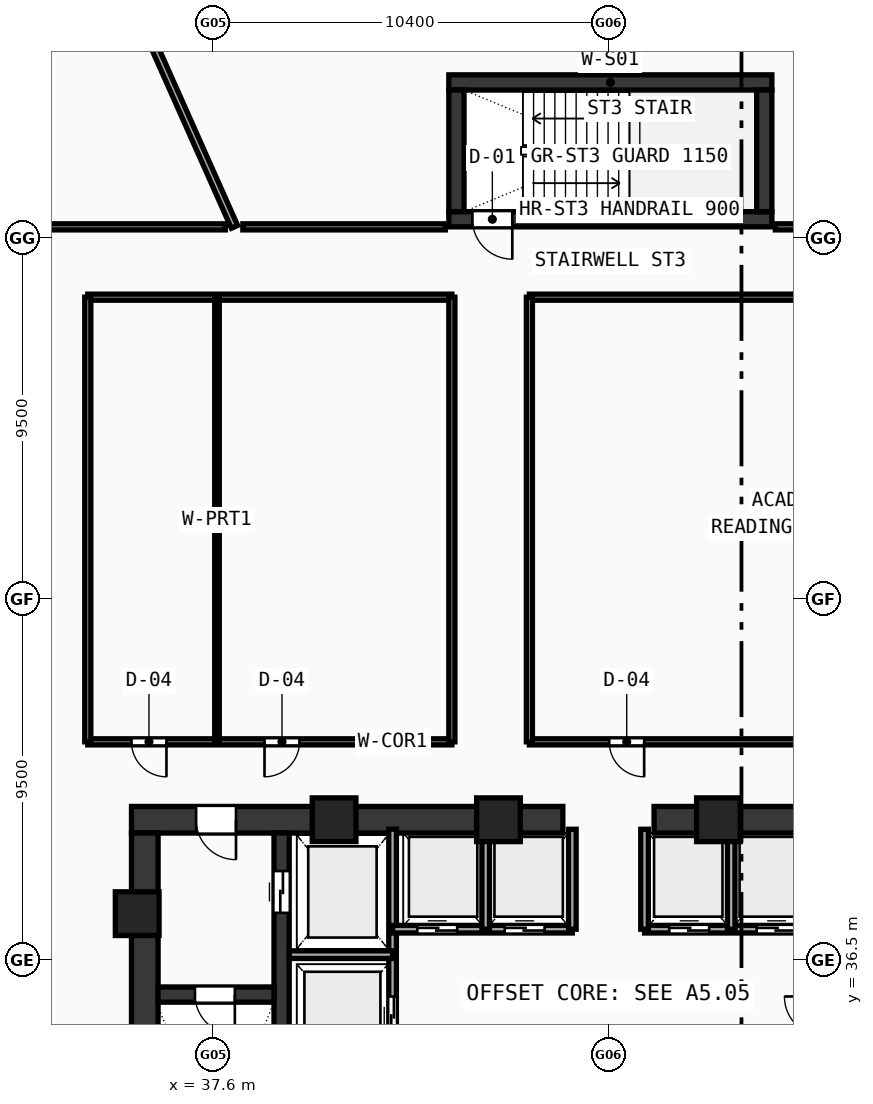
"""IFC4 building model, lengths in metres.
Left out: names, types, materials, properties, quantities, classifications, styles, units other than length and angle.
Written with IfcOpenShell. Run it as: python <this file> out.ifc"""

import sys

from ifc_helpers import new_model, si_unit, direction, frame, frame_2d, origin, origin_with_axes, origin_2d, place, context, subcontext, project, spatial, rectangle, hollow_rectangle, extrude, source, transform, mapped, element, fill, save


model = new_model("IFC4")
c1 = context("Model", 3, precision=1e-05, world=origin(), true_north=direction((0.0, 1.0)))
c2 = subcontext(c1, "Body", "Model", "MODEL_VIEW")
j1 = project(units=[si_unit("LENGTHUNIT", "METRE"), si_unit("PLANEANGLEUNIT", "RADIAN")], contexts=[c1])
p1 = place(None, origin())
s1 = spatial("IfcSite", under=j1, at=p1, CompositionType="ELEMENT")
p2 = place(p1, origin())
s2 = spatial("IfcBuilding", under=s1, at=p2, CompositionType="ELEMENT")
p3 = place(p2, frame((0.0, 0.0, 44.92)))
s3 = spatial("IfcBuildingStorey", under=s2, at=p3, CompositionType="ELEMENT", Elevation=44.92)
p4 = place(p3, frame((35.45, 40.2, 0.0), z_axis=(0.0, 0.0, 1.0), x_axis=(1.0, 0.0, 0.0)))
e1 = element("IfcWall", 1, at=p4, inside=s3, PredefinedType="SHEAR", context=c2, shape_type="SweptSolid", body=[
    extrude(rectangle(XDim=11.35, YDim=0.7, at=frame_2d((5.675, 0.0))), origin(), (0.0, 0.0, 1.0), 3.37),
])
p5 = place(p4, frame((1.7, 0.0, 0.0)))
e2 = element("IfcOpeningElement", 2, at=p5, cuts=e1, PredefinedType="OPENING", context=c2, shape_type="SweptSolid", body=[
    extrude(rectangle(XDim=1.05, YDim=2.1, at=frame_2d((0.525, 1.05))), frame((0.0, 0.36, 0.0), z_axis=(0.0, -1.0, 0.0), x_axis=(1.0, 0.0, 0.0)), (0.0, 0.0, 1.0), 0.72),
])
p6 = place(p3, frame((49.2, 40.2, 0.0), z_axis=(0.0, 0.0, 1.0), x_axis=(1.0, 0.0, 0.0)))
e3 = element("IfcWall", 3, at=p6, inside=s3, PredefinedType="SHEAR", context=c2, shape_type="SweptSolid", body=[
    extrude(rectangle(XDim=11.35, YDim=0.7, at=frame_2d((5.675, 0.0))), origin(), (0.0, 0.0, 1.0), 3.37),
])
p7 = place(p6, frame((8.6, 0.0, 0.0)))
e4 = element("IfcOpeningElement", 4, at=p7, cuts=e3, PredefinedType="OPENING", context=c2, shape_type="SweptSolid", body=[
    extrude(rectangle(XDim=1.05, YDim=2.1, at=frame_2d((0.525, 1.05))), frame((0.0, 0.36, 0.0), z_axis=(0.0, -1.0, 0.0), x_axis=(1.0, 0.0, 0.0)), (0.0, 0.0, 1.0), 0.72),
])
p8 = place(p3, frame((35.8, 27.85, 0.0), z_axis=(0.0, 0.0, 1.0), x_axis=(0.0, 1.0, 0.0)))
e5 = element("IfcWall", 5, at=p8, inside=s3, PredefinedType="SHEAR", context=c2, shape_type="SweptSolid", body=[
    extrude(rectangle(XDim=12.0, YDim=0.7, at=frame_2d((6.0, 0.0))), origin(), (0.0, 0.0, 1.0), 3.37),
])
p9 = place(p3, frame((39.4, 27.85, 0.0), z_axis=(0.0, 0.0, 1.0), x_axis=(0.0, 1.0, 0.0)))
e6 = element("IfcWall", 6, at=p9, inside=s3, PredefinedType="SHEAR", context=c2, shape_type="SweptSolid", body=[
    extrude(rectangle(XDim=12.0, YDim=0.4, at=frame_2d((6.0, 0.0))), origin(), (0.0, 0.0, 1.0), 3.37),
])
p10 = place(p9, frame((9.9, 0.0, 0.0)))
e7 = element("IfcOpeningElement", 7, at=p10, cuts=e6, PredefinedType="OPENING", context=c2, shape_type="SweptSolid", body=[
    extrude(rectangle(XDim=1.1, YDim=2.1, at=frame_2d((0.55, 1.05))), frame((0.0, 0.21, 0.0), z_axis=(0.0, -1.0, 0.0), x_axis=(1.0, 0.0, 0.0)), (0.0, 0.0, 1.0), 0.42),
])
p11 = place(p3, frame((36.15, 35.6, 0.0), z_axis=(0.0, 0.0, 1.0), x_axis=(1.0, 0.0, 0.0)))
e8 = element("IfcWall", 8, at=p11, inside=s3, PredefinedType="SHEAR", context=c2, shape_type="SweptSolid", body=[
    extrude(rectangle(XDim=3.05, YDim=0.4, at=frame_2d((1.525, 0.0))), origin(), (0.0, 0.0, 1.0), 3.37),
])
p12 = place(p11, frame((0.97, 0.0, 0.0)))
e9 = element("IfcOpeningElement", 9, at=p12, cuts=e8, PredefinedType="OPENING", context=c2, shape_type="SweptSolid", body=[
    extrude(rectangle(XDim=1.05, YDim=2.1, at=frame_2d((0.525, 1.05))), frame((0.0, 0.21, 0.0), z_axis=(0.0, -1.0, 0.0), x_axis=(1.0, 0.0, 0.0)), (0.0, 0.0, 1.0), 0.42),
])
p13 = place(p3, frame((43.8, 59.6, 0.0), z_axis=(0.0, 0.0, 1.0), x_axis=(1.0, 0.0, 0.0)))
e10 = element("IfcWall", 10, at=p13, inside=s3, PredefinedType="SHEAR", context=c2, shape_type="SweptSolid", body=[
    extrude(rectangle(XDim=8.5, YDim=0.4, at=frame_2d((4.25, 0.0))), origin(), (0.0, 0.0, 1.0), 3.37),
])
p14 = place(p3, frame((43.8, 56.0, 0.0), z_axis=(0.0, 0.0, 1.0), x_axis=(1.0, 0.0, 0.0)))
e11 = element("IfcWall", 11, at=p14, inside=s3, PredefinedType="SHEAR", context=c2, shape_type="SweptSolid", body=[
    extrude(rectangle(XDim=8.5, YDim=0.4, at=frame_2d((4.25, 0.0))), origin(), (0.0, 0.0, 1.0), 3.37),
])
p15 = place(p14, frame((0.62, 0.0, 0.0)))
e12 = element("IfcOpeningElement", 12, at=p15, cuts=e11, PredefinedType="OPENING", context=c2, shape_type="SweptSolid", body=[
    extrude(rectangle(XDim=1.05, YDim=2.1, at=frame_2d((0.525, 1.05))), frame((0.0, 0.21, 0.0), z_axis=(0.0, -1.0, 0.0), x_axis=(1.0, 0.0, 0.0)), (0.0, 0.0, 1.0), 0.42),
])
for number, where, z_axis, x_axis in (
    (13, (44.0, 56.2, 0.0), (0.0, 0.0, 1.0), (0.0, 1.0, 0.0)),
    (14, (52.1, 56.2, 0.0), (0.0, 0.0, 1.0), (0.0, 1.0, 0.0)),
):
    element("IfcWall", number, at=place(p3, frame(where, z_axis=z_axis, x_axis=x_axis)), inside=s3, PredefinedType="SHEAR", context=c2, shape_type="SweptSolid", body=[
        extrude(rectangle(XDim=3.2, YDim=0.4, at=frame_2d((1.6, 0.0))), origin(), (0.0, 0.0, 1.0), 3.37),
    ])
m1 = source(origin(), c2, "Body", "SweptSolid", [
    extrude(hollow_rectangle(XDim=1.15, YDim=1.15, WallThickness=0.048, at=origin_2d()), origin(), (0.0, 0.0, 1.0), 3.63),
])
for number, where, z_axis, x_axis in (
    (15, (50.894, 40.2, -0.26), (0.0, 0.0, 1.0), (1.0, 0.0, 0.0)),
    (16, (45.106, 40.2, -0.26), (0.0, 0.0, 1.0), (1.0, 0.0, 0.0)),
    (17, (40.781, 40.2, -0.26), (0.0, 0.0, 1.0), (1.0, 0.0, 0.0)),
    (18, (35.6, 37.729, -0.26), (0.0, 0.0, 1.0), (1.0, 0.0, 0.0)),
):
    element("IfcColumn", number, at=place(p3, frame(where, z_axis=z_axis, x_axis=x_axis)), inside=s3, PredefinedType="COLUMN", context=c2, shape_type="MappedRepresentation", body=[
        mapped(m1, transform((0.0, 0.0, 0.0), scale=1.0)),
    ])
p16 = place(p3, frame((42.32, 33.5, 0.0), z_axis=(0.0, 0.0, 1.0), x_axis=(0.0, 1.0, 0.0)))
e19 = element("IfcWall", 19, at=p16, inside=s3, PredefinedType="SOLIDWALL", context=c2, shape_type="SweptSolid", body=[
    extrude(rectangle(XDim=6.45, YDim=0.2, at=frame_2d((3.225, 0.0))), origin(), (0.0, 0.0, 1.0), 3.37),
])
p17 = place(p16, frame((1.0, 0.0, 0.0)))
e20 = element("IfcOpeningElement", 20, at=p17, cuts=e19, PredefinedType="OPENING", context=c2, shape_type="SweptSolid", body=[
    extrude(rectangle(XDim=1.05, YDim=2.1, at=frame_2d((0.525, 1.05))), frame((0.0, 0.11, 0.0), z_axis=(0.0, -1.0, 0.0), x_axis=(1.0, 0.0, 0.0)), (0.0, 0.0, 1.0), 0.22),
])
p18 = place(p3, frame((39.6, 36.65, 0.0), z_axis=(0.0, 0.0, 1.0), x_axis=(1.0, 0.0, 0.0)))
e21 = element("IfcWall", 21, at=p18, inside=s3, PredefinedType="SOLIDWALL", context=c2, shape_type="SweptSolid", body=[
    extrude(rectangle(XDim=2.72, YDim=0.2, at=frame_2d((1.36, 0.0))), origin(), (0.0, 0.0, 1.0), 3.37),
])
p19 = place(p3, frame((42.32, 37.32, 0.0), z_axis=(0.0, 0.0, 1.0), x_axis=(1.0, 0.0, 0.0)))
e22 = element("IfcWall", 22, at=p19, inside=s3, PredefinedType="SOLIDWALL", context=c2, shape_type="SweptSolid", body=[
    extrude(rectangle(XDim=4.73, YDim=0.2, at=frame_2d((2.365, 0.0))), origin(), (0.0, 0.0, 1.0), 3.37),
])
p20 = place(p19, frame((0.65, 0.0, 0.0)))
e23 = element("IfcOpeningElement", 23, at=p20, cuts=e22, PredefinedType="OPENING", context=c2, shape_type="SweptSolid", body=[
    extrude(rectangle(XDim=1.05, YDim=2.1, at=frame_2d((0.525, 1.05))), frame((0.0, 0.11, 0.0), z_axis=(0.0, -1.0, 0.0), x_axis=(1.0, 0.0, 0.0)), (0.0, 0.0, 1.0), 0.22),
])
p21 = place(p19, frame((2.95, 0.0, 0.0)))
e24 = element("IfcOpeningElement", 24, at=p21, cuts=e22, PredefinedType="OPENING", context=c2, shape_type="SweptSolid", body=[
    extrude(rectangle(XDim=1.05, YDim=2.1, at=frame_2d((0.525, 1.05))), frame((0.0, 0.11, 0.0), z_axis=(0.0, -1.0, 0.0), x_axis=(1.0, 0.0, 0.0)), (0.0, 0.0, 1.0), 0.22),
])
p22 = place(p3, frame((48.95, 37.32, 0.0), z_axis=(0.0, 0.0, 1.0), x_axis=(1.0, 0.0, 0.0)))
e25 = element("IfcWall", 25, at=p22, inside=s3, PredefinedType="SOLIDWALL", context=c2, shape_type="SweptSolid", body=[
    extrude(rectangle(XDim=4.73, YDim=0.2, at=frame_2d((2.365, 0.0))), origin(), (0.0, 0.0, 1.0), 3.37),
])
p23 = place(p22, frame((0.65, 0.0, 0.0)))
e26 = element("IfcOpeningElement", 26, at=p23, cuts=e25, PredefinedType="OPENING", context=c2, shape_type="SweptSolid", body=[
    extrude(rectangle(XDim=1.05, YDim=2.1, at=frame_2d((0.525, 1.05))), frame((0.0, 0.11, 0.0), z_axis=(0.0, -1.0, 0.0), x_axis=(1.0, 0.0, 0.0)), (0.0, 0.0, 1.0), 0.22),
])
p24 = place(p22, frame((2.95, 0.0, 0.0)))
e27 = element("IfcOpeningElement", 27, at=p24, cuts=e25, PredefinedType="OPENING", context=c2, shape_type="SweptSolid", body=[
    extrude(rectangle(XDim=1.05, YDim=2.1, at=frame_2d((0.525, 1.05))), frame((0.0, 0.11, 0.0), z_axis=(0.0, -1.0, 0.0), x_axis=(1.0, 0.0, 0.0)), (0.0, 0.0, 1.0), 0.22),
])
for number, where, z_axis, x_axis in (
    (28, (47.05, 37.32, 0.0), (0.0, 0.0, 1.0), (0.0, 1.0, 0.0)),
    (29, (48.95, 37.32, 0.0), (0.0, 0.0, 1.0), (0.0, 1.0, 0.0)),
    (30, (44.77, 37.32, 0.0), (0.0, 0.0, 1.0), (0.0, 1.0, 0.0)),
    (31, (51.23, 37.32, 0.0), (0.0, 0.0, 1.0), (0.0, 1.0, 0.0)),
):
    element("IfcWall", number, at=place(p3, frame(where, z_axis=z_axis, x_axis=x_axis)), inside=s3, PredefinedType="SOLIDWALL", context=c2, shape_type="SweptSolid", body=[
        extrude(rectangle(XDim=2.63, YDim=0.2, at=frame_2d((1.315, 0.0))), origin(), (0.0, 0.0, 1.0), 3.37),
    ])
p25 = place(p3, frame((34.3, 42.25, 0.0), z_axis=(0.0, 0.0, 1.0), x_axis=(1.0, 0.0, 0.0)))
e32 = element("IfcWall", 32, at=p25, inside=s3, PredefinedType="PARTITIONING", context=c2, shape_type="SweptSolid", body=[
    extrude(rectangle(XDim=9.58, YDim=0.16, at=frame_2d((4.79, 0.0))), origin(), (0.0, 0.0, 1.0), 2.67),
])
p26 = place(p25, frame((1.15, 0.0, 0.0)))
e33 = element("IfcOpeningElement", 33, at=p26, cuts=e32, PredefinedType="OPENING", context=c2, shape_type="SweptSolid", body=[
    extrude(rectangle(XDim=0.92, YDim=2.1, at=frame_2d((0.46, 1.05))), frame((0.0, 0.09, 0.0), z_axis=(0.0, -1.0, 0.0), x_axis=(1.0, 0.0, 0.0)), (0.0, 0.0, 1.0), 0.18),
])
p27 = place(p25, frame((4.65, 0.0, 0.0)))
e34 = element("IfcOpeningElement", 34, at=p27, cuts=e32, PredefinedType="OPENING", context=c2, shape_type="SweptSolid", body=[
    extrude(rectangle(XDim=0.92, YDim=2.1, at=frame_2d((0.46, 1.05))), frame((0.0, 0.09, 0.0), z_axis=(0.0, -1.0, 0.0), x_axis=(1.0, 0.0, 0.0)), (0.0, 0.0, 1.0), 0.18),
])
p28 = place(p3, frame((34.3, 53.95, 0.0), z_axis=(0.0, 0.0, 1.0), x_axis=(1.0, 0.0, 0.0)))
e35 = element("IfcWall", 35, at=p28, inside=s3, PredefinedType="PARTITIONING", context=c2, shape_type="SweptSolid", body=[
    extrude(rectangle(XDim=9.58, YDim=0.16, at=frame_2d((4.79, 0.0))), origin(), (0.0, 0.0, 1.0), 2.67),
])
for number, where, z_axis, x_axis in (
    (36, (34.3, 42.25, 0.0), (0.0, 0.0, 1.0), (0.0, 1.0, 0.0)),
    (37, (43.88, 42.25, 0.0), (0.0, 0.0, 1.0), (0.0, 1.0, 0.0)),
):
    element("IfcWall", number, at=place(p3, frame(where, z_axis=z_axis, x_axis=x_axis)), inside=s3, PredefinedType="PARTITIONING", context=c2, shape_type="SweptSolid", body=[
        extrude(rectangle(XDim=11.7, YDim=0.16, at=frame_2d((5.85, 0.0))), origin(), (0.0, 0.0, 1.0), 2.67),
    ])
p29 = place(p3, frame((37.7, 42.25, 0.0), z_axis=(0.0, 0.0, 1.0), x_axis=(0.0, 1.0, 0.0)))
e38 = element("IfcWall", 38, at=p29, inside=s3, PredefinedType="PARTITIONING", context=c2, shape_type="SweptSolid", body=[
    extrude(rectangle(XDim=11.7, YDim=0.12, at=frame_2d((5.85, 0.0))), origin(), (0.0, 0.0, 1.0), 2.67),
])
p30 = place(p3, frame((45.92, 42.25, 0.0), z_axis=(0.0, 0.0, 1.0), x_axis=(1.0, 0.0, 0.0)))
e39 = element("IfcWall", 39, at=p30, inside=s3, PredefinedType="PARTITIONING", context=c2, shape_type="SweptSolid", body=[
    extrude(rectangle(XDim=16.43, YDim=0.16, at=frame_2d((8.215, 0.0))), origin(), (0.0, 0.0, 1.0), 2.67),
])
p31 = place(p30, frame((2.1, 0.0, 0.0)))
e40 = element("IfcOpeningElement", 40, at=p31, cuts=e39, PredefinedType="OPENING", context=c2, shape_type="SweptSolid", body=[
    extrude(rectangle(XDim=0.92, YDim=2.1, at=frame_2d((0.46, 1.05))), frame((0.0, 0.09, 0.0), z_axis=(0.0, -1.0, 0.0), x_axis=(1.0, 0.0, 0.0)), (0.0, 0.0, 1.0), 0.18),
])
p32 = place(p30, frame((14.18, 0.0, 0.0)))
e41 = element("IfcOpeningElement", 41, at=p32, cuts=e39, PredefinedType="OPENING", context=c2, shape_type="SweptSolid", body=[
    extrude(rectangle(XDim=0.94, YDim=2.1, at=frame_2d((0.47, 1.05))), frame((0.0, 0.09, 0.0), z_axis=(0.0, -1.0, 0.0), x_axis=(1.0, 0.0, 0.0)), (0.0, 0.0, 1.0), 0.18),
])
p33 = place(p3, frame((45.92, 53.95, 0.0), z_axis=(0.0, 0.0, 1.0), x_axis=(1.0, 0.0, 0.0)))
e42 = element("IfcWall", 42, at=p33, inside=s3, PredefinedType="PARTITIONING", context=c2, shape_type="SweptSolid", body=[
    extrude(rectangle(XDim=16.43, YDim=0.16, at=frame_2d((8.215, 0.0))), origin(), (0.0, 0.0, 1.0), 2.67),
])
p34 = place(p3, frame((45.92, 42.25, 0.0), z_axis=(0.0, 0.0, 1.0), x_axis=(0.0, 1.0, 0.0)))
e43 = element("IfcWall", 43, at=p34, inside=s3, PredefinedType="PARTITIONING", context=c2, shape_type="SweptSolid", body=[
    extrude(rectangle(XDim=11.7, YDim=0.16, at=frame_2d((5.85, 0.0))), origin(), (0.0, 0.0, 1.0), 2.97),
])
p35 = place(p3, frame((38.16, 55.8, 0.0), z_axis=(0.0, 0.0, 1.0), x_axis=(-0.406730734994, 0.913548088067, 0.0)))
e44 = element("IfcWall", 44, at=p35, inside=s3, PredefinedType="PARTITIONING", context=c2, shape_type="SweptSolid", body=[
    extrude(rectangle(XDim=18.356, YDim=0.18, at=frame_2d((9.178, 0.0))), origin(), (0.0, 0.0, 1.0), 2.67),
])
p36 = place(p3, frame((32.45, 55.8, 0.0), z_axis=(0.0, 0.0, 1.0), x_axis=(1.0, 0.0, 0.0)))
e45 = element("IfcWall", 45, at=p36, inside=s3, PredefinedType="PARTITIONING", context=c2, shape_type="SweptSolid", body=[
    extrude(rectangle(XDim=5.47, YDim=0.16, at=frame_2d((2.735, 0.0))), origin(), (0.0, 0.0, 1.0), 3.37),
])
p37 = place(p3, frame((38.38, 55.8, 0.0), z_axis=(0.0, 0.0, 1.0), x_axis=(1.0, 0.0, 0.0)))
e46 = element("IfcWall", 46, at=p37, inside=s3, PredefinedType="PARTITIONING", context=c2, shape_type="SweptSolid", body=[
    extrude(rectangle(XDim=5.329, YDim=0.16, at=frame_2d((2.665, 0.0))), origin(), (0.0, 0.0, 1.0), 2.67),
])
p38 = place(p3, frame((52.391, 55.8, 0.0), z_axis=(0.0, 0.0, 1.0), x_axis=(1.0, 0.0, 0.0)))
e47 = element("IfcWall", 47, at=p38, inside=s3, PredefinedType="PARTITIONING", context=c2, shape_type="SweptSolid", body=[
    extrude(rectangle(XDim=11.809, YDim=0.16, at=frame_2d((5.904, 0.0))), origin(), (0.0, 0.0, 1.0), 2.67),
])
p39 = place(p38, frame((5.624, 0.0, 0.0)))
e48 = element("IfcOpeningElement", 48, at=p39, cuts=e47, PredefinedType="OPENING", context=c2, shape_type="SweptSolid", body=[
    extrude(rectangle(XDim=0.95, YDim=2.1, at=frame_2d((0.475, 1.05))), frame((0.0, 0.09, 0.0), z_axis=(0.0, -1.0, 0.0), x_axis=(1.0, 0.0, 0.0)), (0.0, 0.0, 1.0), 0.18),
])
m2 = source(origin(), c2, "Body", "SweptSolid", [
    extrude(rectangle(XDim=1.05, YDim=2.1, at=frame_2d((0.525, 1.05))), frame((0.0, 0.025, 0.0), z_axis=(0.0, -1.0, 0.0), x_axis=(1.0, 0.0, 0.0)), (0.0, 0.0, 1.0), 0.05),
])
p40 = place(p12, frame((1.05, 0.0, 0.0), z_axis=(0.0, 0.0, 1.0), x_axis=(-1.0, 0.0, 0.0)))
e49 = element("IfcDoor", 49, at=p40, inside=s3, OperationType="SINGLE_SWING_LEFT", PredefinedType="DOOR", context=c2, shape_type="MappedRepresentation", body=[
    mapped(m2, transform((0.0, 0.0, 0.0), scale=1.0)),
])
fill(e9, e49)
p41 = place(p5, frame((1.05, 0.0, 0.0), z_axis=(0.0, 0.0, 1.0), x_axis=(-1.0, 0.0, 0.0)))
e50 = element("IfcDoor", 50, at=p41, inside=s3, OperationType="SINGLE_SWING_LEFT", PredefinedType="DOOR", context=c2, shape_type="MappedRepresentation", body=[
    mapped(m2, transform((0.0, 0.0, 0.0), scale=1.0)),
])
fill(e2, e50)
m3 = source(origin(), c2, "Body", "SweptSolid", [
    extrude(rectangle(XDim=1.1, YDim=2.1, at=frame_2d((0.55, 1.05))), frame((0.0, 0.025, 0.0), z_axis=(0.0, -1.0, 0.0), x_axis=(1.0, 0.0, 0.0)), (0.0, 0.0, 1.0), 0.05),
])
p42 = place(p10, frame((1.1, 0.0, 0.0), z_axis=(0.0, 0.0, 1.0), x_axis=(-1.0, 0.0, 0.0)))
e51 = element("IfcDoor", 51, at=p42, inside=s3, OperationType="DOUBLE_DOOR_SLIDING", PredefinedType="DOOR", context=c2, shape_type="MappedRepresentation", body=[
    mapped(m3, transform((0.0, 0.0, 0.0), scale=1.0)),
])
fill(e7, e51)
p43 = place(p17, origin_with_axes())
e52 = element("IfcDoor", 52, at=p43, inside=s3, OperationType="DOUBLE_DOOR_SLIDING", PredefinedType="DOOR", context=c2, shape_type="MappedRepresentation", body=[
    mapped(m2, transform((0.0, 0.0, 0.0), scale=1.0)),
])
fill(e20, e52)
p44 = place(p20, frame((1.05, 0.0, 0.0), z_axis=(0.0, 0.0, 1.0), x_axis=(-1.0, 0.0, 0.0)))
e53 = element("IfcDoor", 53, at=p44, inside=s3, OperationType="DOUBLE_DOOR_SLIDING", PredefinedType="DOOR", context=c2, shape_type="MappedRepresentation", body=[
    mapped(m2, transform((0.0, 0.0, 0.0), scale=1.0)),
])
fill(e23, e53)
p45 = place(p21, frame((1.05, 0.0, 0.0), z_axis=(0.0, 0.0, 1.0), x_axis=(-1.0, 0.0, 0.0)))
e54 = element("IfcDoor", 54, at=p45, inside=s3, OperationType="DOUBLE_DOOR_SLIDING", PredefinedType="DOOR", context=c2, shape_type="MappedRepresentation", body=[
    mapped(m2, transform((0.0, 0.0, 0.0), scale=1.0)),
])
fill(e24, e54)
p46 = place(p23, frame((1.05, 0.0, 0.0), z_axis=(0.0, 0.0, 1.0), x_axis=(-1.0, 0.0, 0.0)))
e55 = element("IfcDoor", 55, at=p46, inside=s3, OperationType="DOUBLE_DOOR_SLIDING", PredefinedType="DOOR", context=c2, shape_type="MappedRepresentation", body=[
    mapped(m2, transform((0.0, 0.0, 0.0), scale=1.0)),
])
fill(e26, e55)
p47 = place(p24, frame((1.05, 0.0, 0.0), z_axis=(0.0, 0.0, 1.0), x_axis=(-1.0, 0.0, 0.0)))
e56 = element("IfcDoor", 56, at=p47, inside=s3, OperationType="DOUBLE_DOOR_SLIDING", PredefinedType="DOOR", context=c2, shape_type="MappedRepresentation", body=[
    mapped(m2, transform((0.0, 0.0, 0.0), scale=1.0)),
])
fill(e27, e56)
p48 = place(p15, frame((1.05, 0.0, 0.0), z_axis=(0.0, 0.0, 1.0), x_axis=(-1.0, 0.0, 0.0)))
e57 = element("IfcDoor", 57, at=p48, inside=s3, OperationType="SINGLE_SWING_LEFT", PredefinedType="DOOR", context=c2, shape_type="MappedRepresentation", body=[
    mapped(m2, transform((0.0, 0.0, 0.0), scale=1.0)),
])
fill(e12, e57)
m4 = source(origin(), c2, "Body", "SweptSolid", [
    extrude(rectangle(XDim=0.92, YDim=2.1, at=frame_2d((0.46, 1.05))), frame((0.0, 0.025, 0.0), z_axis=(0.0, -1.0, 0.0), x_axis=(1.0, 0.0, 0.0)), (0.0, 0.0, 1.0), 0.05),
])
p49 = place(p26, frame((0.92, 0.0, 0.0), z_axis=(0.0, 0.0, 1.0), x_axis=(-1.0, 0.0, 0.0)))
e58 = element("IfcDoor", 58, at=p49, inside=s3, OperationType="SINGLE_SWING_LEFT", PredefinedType="DOOR", context=c2, shape_type="MappedRepresentation", body=[
    mapped(m4, transform((0.0, 0.0, 0.0), scale=1.0)),
])
fill(e33, e58)
p50 = place(p27, frame((0.92, 0.0, 0.0), z_axis=(0.0, 0.0, 1.0), x_axis=(-1.0, 0.0, 0.0)))
e59 = element("IfcDoor", 59, at=p50, inside=s3, OperationType="SINGLE_SWING_RIGHT", PredefinedType="DOOR", context=c2, shape_type="MappedRepresentation", body=[
    mapped(m4, transform((0.0, 0.0, 0.0), scale=1.0)),
])
fill(e34, e59)
p51 = place(p31, frame((0.92, 0.0, 0.0), z_axis=(0.0, 0.0, 1.0), x_axis=(-1.0, 0.0, 0.0)))
e60 = element("IfcDoor", 60, at=p51, inside=s3, OperationType="SINGLE_SWING_LEFT", PredefinedType="DOOR", context=c2, shape_type="MappedRepresentation", body=[
    mapped(m4, transform((0.0, 0.0, 0.0), scale=1.0)),
])
fill(e40, e60)
save(model, sys.argv[1])
